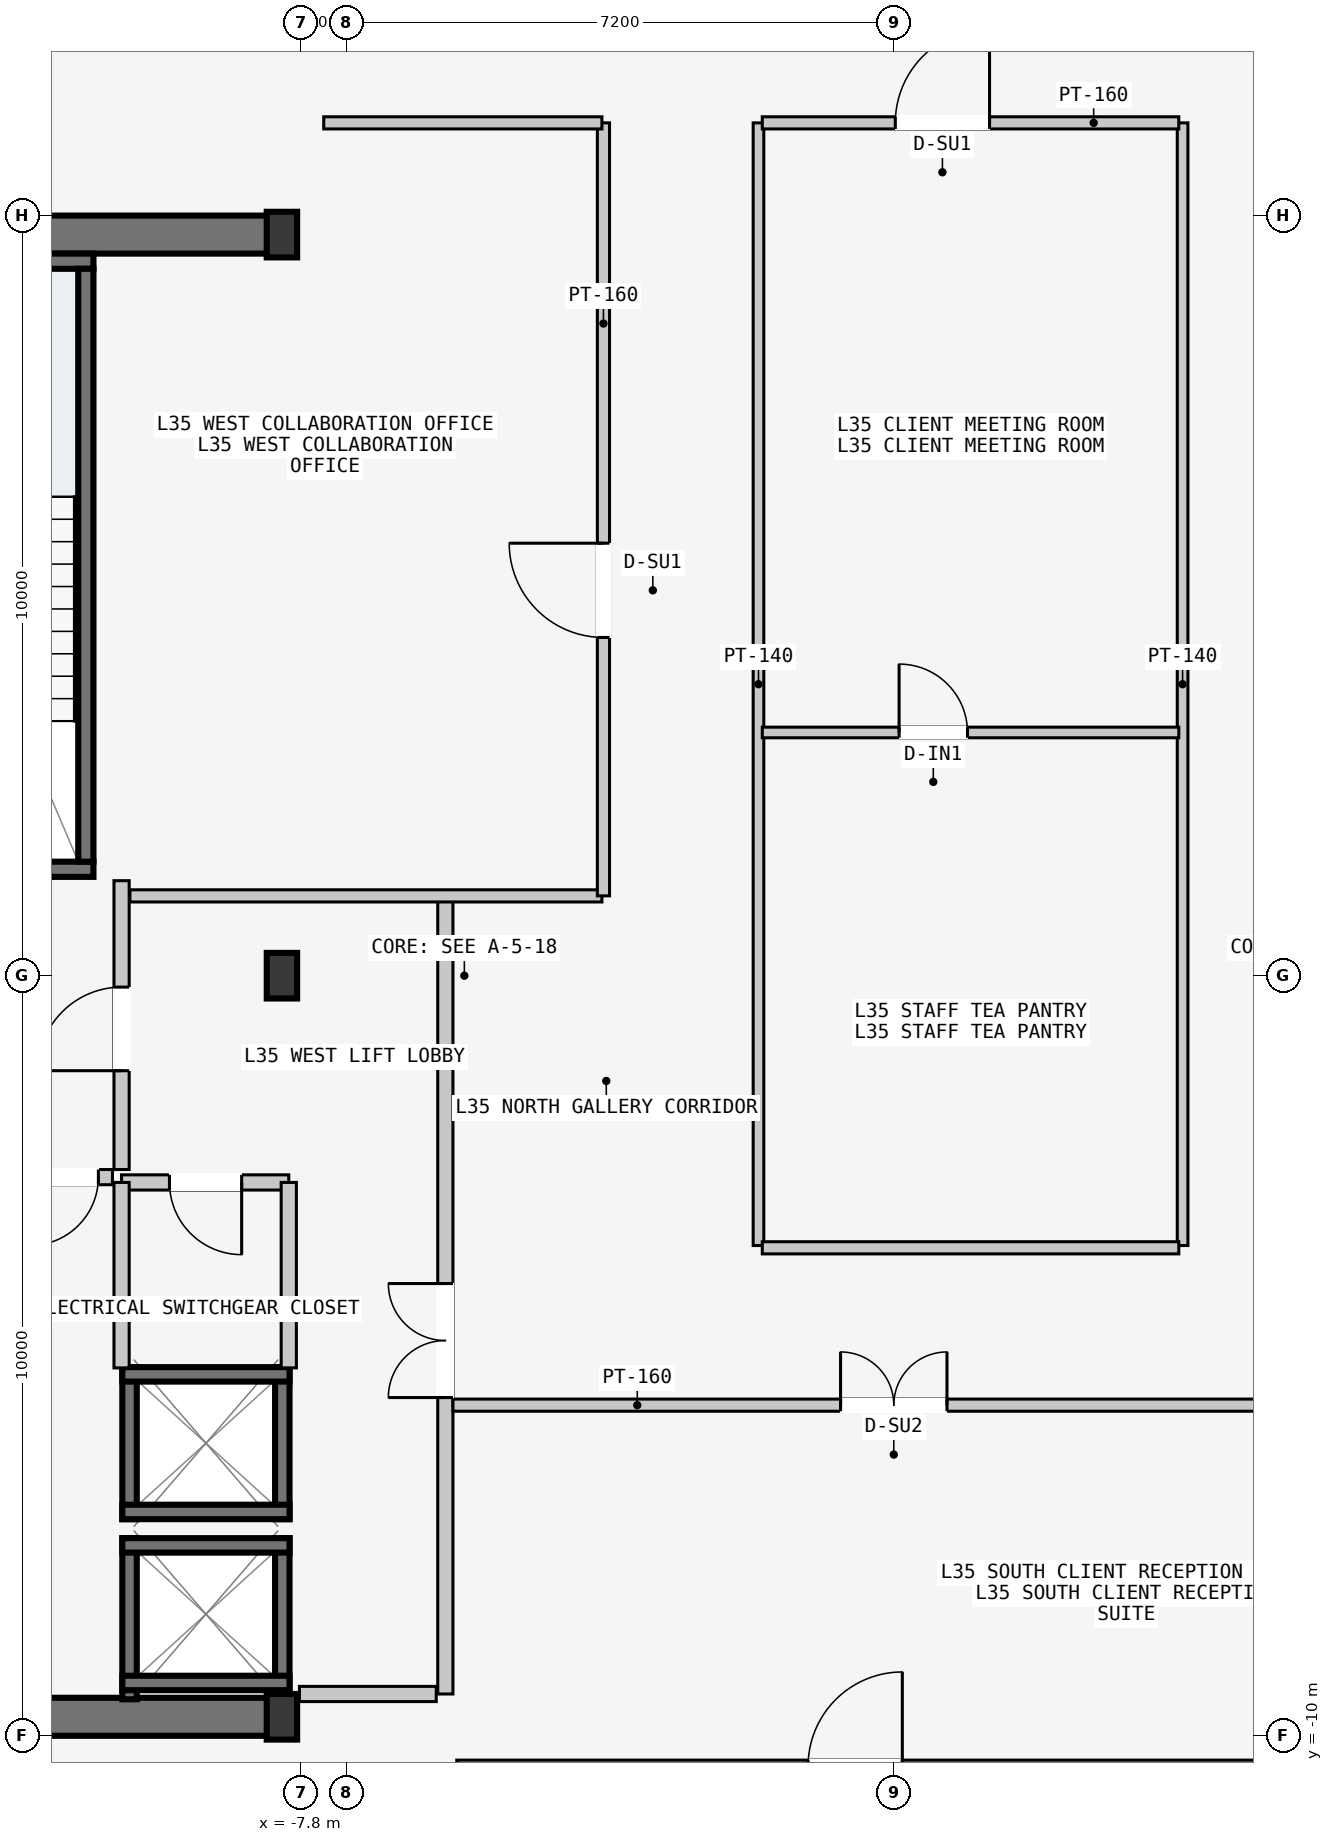
"""IFC4 building model, lengths in metres.
Left out: names, types, materials, properties, quantities, classifications, styles, units other than length and angle.
Written with IfcOpenShell. Run it as: python <this file> out.ifc"""

import sys

from ifc_helpers import new_model, si_unit, direction, frame, frame_2d, origin, origin_2d, place, context, subcontext, project, spatial, rectangle, i_section, extrude, element, fill, save


model = new_model("IFC4")
c1 = context("Model", 3, precision=1e-05, world=origin(), true_north=direction((0.0, 1.0)))
c2 = subcontext(c1, "Body", "Model", "MODEL_VIEW")
j1 = project(units=[si_unit("LENGTHUNIT", "METRE"), si_unit("PLANEANGLEUNIT", "RADIAN")], contexts=[c1])
p1 = place(None, origin())
s1 = spatial("IfcSite", under=j1, at=p1, CompositionType="ELEMENT")
p2 = place(p1, origin())
s2 = spatial("IfcBuilding", under=s1, at=p2, CompositionType="ELEMENT")
p3 = place(p2, frame((0.0, 0.0, 135.0)))
s3 = spatial("IfcBuildingStorey", under=s2, at=p3, CompositionType="ELEMENT", Elevation=135.0)
for number, where, z_axis, x_axis in (
    (1, (-14.53, -9.75, -0.2), (0.0, 0.0, 1.0), (1.0, 0.0, 0.0)),
    (2, (-14.53, 9.75, -0.2), (0.0, 0.0, 1.0), (1.0, 0.0, 0.0)),
):
    element("IfcWall", number, at=place(p3, frame(where, z_axis=z_axis, x_axis=x_axis)), inside=s3, PredefinedType="SHEAR", context=c2, shape_type="SweptSolid", body=[
        extrude(rectangle(XDim=6.46, YDim=0.5, at=frame_2d((3.23, 0.0))), origin(), (0.0, 0.0, 1.0), 3.6),
    ])
p4 = place(p3, frame((-14.25, 1.4, -0.2), z_axis=(0.0, 0.0, 1.0), x_axis=(1.0, 0.0, 0.0)))
e3 = element("IfcWall", 3, at=p4, inside=s3, PredefinedType="SOLIDWALL", context=c2, shape_type="SweptSolid", body=[
    extrude(rectangle(XDim=3.72, YDim=0.2, at=frame_2d((1.86, 0.0))), origin(), (0.0, 0.0, 1.0), 3.6),
])
p5 = place(p4, frame((1.5, 0.0, 0.2)))
e4 = element("IfcOpeningElement", 4, at=p5, cuts=e3, PredefinedType="OPENING", context=c2, shape_type="SweptSolid", body=[
    extrude(rectangle(XDim=1.12, YDim=2.18, at=frame_2d((0.56, 1.09))), frame((0.0, 0.11, 0.0), z_axis=(0.0, -1.0, 0.0), x_axis=(1.0, 0.0, 0.0)), (0.0, 0.0, 1.0), 0.22),
])
p6 = place(p3, frame((-14.25, 9.4, -0.2), z_axis=(0.0, 0.0, 1.0), x_axis=(1.0, 0.0, 0.0)))
e5 = element("IfcWall", 5, at=p6, inside=s3, PredefinedType="SOLIDWALL", context=c2, shape_type="SweptSolid", body=[
    extrude(rectangle(XDim=3.72, YDim=0.2, at=frame_2d((1.86, 0.0))), origin(), (0.0, 0.0, 1.0), 3.6),
])
p7 = place(p3, frame((-10.63, 1.5, -0.2), z_axis=(0.0, 0.0, 1.0), x_axis=(0.0, 1.0, 0.0)))
e6 = element("IfcWall", 6, at=p7, inside=s3, PredefinedType="SOLIDWALL", context=c2, shape_type="SweptSolid", body=[
    extrude(rectangle(XDim=7.8, YDim=0.2, at=frame_2d((3.9, 0.0))), origin(), (0.0, 0.0, 1.0), 3.6),
])
for number, where, z_axis, x_axis in (
    (7, (-8.05, -9.75, 0.0), (0.0, 0.0, 1.0), (1.0, 0.0, 0.0)),
    (8, (-8.05, 0.0, 0.0), (0.0, 0.0, 1.0), (1.0, 0.0, 0.0)),
    (9, (-8.05, 9.75, 0.0), (0.0, 0.0, 1.0), (1.0, 0.0, 0.0)),
):
    element("IfcColumn", number, at=place(p3, frame(where, z_axis=z_axis, x_axis=x_axis)), inside=s3, PredefinedType="COLUMN", context=c2, shape_type="SweptSolid", body=[
        extrude(i_section(OverallWidth=0.4, OverallDepth=0.6, WebThickness=0.022, FlangeThickness=0.036, at=origin_2d()), origin(), (0.0, 0.0, 1.0), 3.6),
    ])
for number, where, z_axis, x_axis in (
    (10, (-8.045, -9.52, -0.2), (0.0, 0.0, 1.0), (0.0, 1.0, 0.0)),
    (11, (-10.055, -9.52, -0.2), (0.0, 0.0, 1.0), (0.0, 1.0, 0.0)),
):
    element("IfcWall", number, at=place(p3, frame(where, z_axis=z_axis, x_axis=x_axis)), inside=s3, PredefinedType="SOLIDWALL", context=c2, shape_type="SweptSolid", body=[
        extrude(rectangle(XDim=2.12, YDim=0.19, at=frame_2d((1.06, 0.0))), origin(), (0.0, 0.0, 1.0), 3.6),
    ])
for number, where, z_axis, x_axis in (
    (12, (-10.15, -7.495, -0.2), (0.0, 0.0, 1.0), (1.0, 0.0, 0.0)),
    (13, (-10.15, -9.305, -0.2), (0.0, 0.0, 1.0), (1.0, 0.0, 0.0)),
):
    element("IfcWall", number, at=place(p3, frame(where, z_axis=z_axis, x_axis=x_axis)), inside=s3, PredefinedType="SOLIDWALL", context=c2, shape_type="SweptSolid", body=[
        extrude(rectangle(XDim=2.2, YDim=0.19, at=frame_2d((1.1, 0.0))), origin(), (0.0, 0.0, 1.0), 3.6),
    ])
for number, where, z_axis, x_axis in (
    (14, (-8.045, -7.15, -0.2), (0.0, 0.0, 1.0), (0.0, 1.0, 0.0)),
    (15, (-10.055, -7.15, -0.2), (0.0, 0.0, 1.0), (0.0, 1.0, 0.0)),
):
    element("IfcWall", number, at=place(p3, frame(where, z_axis=z_axis, x_axis=x_axis)), inside=s3, PredefinedType="SOLIDWALL", context=c2, shape_type="SweptSolid", body=[
        extrude(rectangle(XDim=2.0, YDim=0.19, at=frame_2d((1.0, 0.0))), origin(), (0.0, 0.0, 1.0), 3.6),
    ])
for number, where, z_axis, x_axis in (
    (16, (-10.15, -5.245, -0.2), (0.0, 0.0, 1.0), (1.0, 0.0, 0.0)),
    (17, (-10.15, -7.055, -0.2), (0.0, 0.0, 1.0), (1.0, 0.0, 0.0)),
):
    element("IfcWall", number, at=place(p3, frame(where, z_axis=z_axis, x_axis=x_axis)), inside=s3, PredefinedType="SOLIDWALL", context=c2, shape_type="SweptSolid", body=[
        extrude(rectangle(XDim=2.2, YDim=0.19, at=frame_2d((1.1, 0.0))), origin(), (0.0, 0.0, 1.0), 3.6),
    ])
p8 = place(p3, frame((-5.9, -9.45, 0.0), z_axis=(0.0, 0.0, 1.0), x_axis=(0.0, 1.0, 0.0)))
e18 = element("IfcWall", 18, at=p8, inside=s3, PredefinedType="PARTITIONING", context=c2, shape_type="SweptSolid", body=[
    extrude(rectangle(XDim=10.5, YDim=0.2, at=frame_2d((5.25, 0.0))), origin(), (0.0, 0.0, 1.0), 3.4),
])
p9 = place(p8, frame((3.9, 0.0, 0.0)))
e19 = element("IfcOpeningElement", 19, at=p9, cuts=e18, PredefinedType="OPENING", context=c2, shape_type="SweptSolid", body=[
    extrude(rectangle(XDim=1.5, YDim=2.2, at=frame_2d((0.75, 1.1))), frame((0.0, 0.11, 0.0), z_axis=(0.0, -1.0, 0.0), x_axis=(1.0, 0.0, 0.0)), (0.0, 0.0, 1.0), 0.22),
])
p10 = place(p3, frame((-6.02, -9.45, 0.0), z_axis=(0.0, 0.0, 1.0), x_axis=(-1.0, 0.0, 0.0)))
e20 = element("IfcWall", 20, at=p10, inside=s3, PredefinedType="PARTITIONING", context=c2, shape_type="SweptSolid", body=[
    extrude(rectangle(XDim=1.8, YDim=0.2, at=frame_2d((0.9, 0.0))), origin(), (0.0, 0.0, 1.0), 3.4),
])
p11 = place(p3, frame((-10.16, -2.55, 0.0), z_axis=(0.0, 0.0, 1.0), x_axis=(0.0, 1.0, 0.0)))
e21 = element("IfcWall", 21, at=p11, inside=s3, PredefinedType="PARTITIONING", context=c2, shape_type="SweptSolid", body=[
    extrude(rectangle(XDim=3.8, YDim=0.2, at=frame_2d((1.9, 0.0))), origin(), (0.0, 0.0, 1.0), 3.4),
])
p12 = place(p11, frame((1.3, 0.0, 0.0)))
e22 = element("IfcOpeningElement", 22, at=p12, cuts=e21, PredefinedType="OPENING", context=c2, shape_type="SweptSolid", body=[
    extrude(rectangle(XDim=1.1, YDim=2.15, at=frame_2d((0.55, 1.075))), frame((0.0, 0.11, 0.0), z_axis=(0.0, -1.0, 0.0), x_axis=(1.0, 0.0, 0.0)), (0.0, 0.0, 1.0), 0.22),
])
p13 = place(p3, frame((-10.28, -2.65, 0.0), z_axis=(0.0, 0.0, 1.0), x_axis=(-1.0, 0.0, 0.0)))
e23 = element("IfcWall", 23, at=p13, inside=s3, PredefinedType="PARTITIONING", context=c2, shape_type="SweptSolid", body=[
    extrude(rectangle(XDim=1.27, YDim=0.2, at=frame_2d((0.635, 0.0))), origin(), (0.0, 0.0, 1.0), 3.4),
])
p14 = place(p13, frame((0.185, 0.0, 0.0)))
e24 = element("IfcOpeningElement", 24, at=p14, cuts=e23, PredefinedType="OPENING", context=c2, shape_type="SweptSolid", body=[
    extrude(rectangle(XDim=0.9, YDim=2.15, at=frame_2d((0.45, 1.075))), frame((0.0, 0.11, 0.0), z_axis=(0.0, -1.0, 0.0), x_axis=(1.0, 0.0, 0.0)), (0.0, 0.0, 1.0), 0.22),
])
p15 = place(p3, frame((-7.96, -2.72, 0.0), z_axis=(0.0, 0.0, 1.0), x_axis=(-1.0, 0.0, 0.0)))
e25 = element("IfcWall", 25, at=p15, inside=s3, PredefinedType="PARTITIONING", context=c2, shape_type="SweptSolid", body=[
    extrude(rectangle(XDim=2.2, YDim=0.2, at=frame_2d((1.1, 0.0))), origin(), (0.0, 0.0, 1.0), 3.4),
])
p16 = place(p15, frame((0.62, 0.0, 0.0)))
e26 = element("IfcOpeningElement", 26, at=p16, cuts=e25, PredefinedType="OPENING", context=c2, shape_type="SweptSolid", body=[
    extrude(rectangle(XDim=0.95, YDim=2.1, at=frame_2d((0.475, 1.05))), frame((0.0, 0.11, 0.0), z_axis=(0.0, -1.0, 0.0), x_axis=(1.0, 0.0, 0.0)), (0.0, 0.0, 1.0), 0.22),
])
for number, where, z_axis, x_axis in (
    (27, (-7.96, -5.16, 0.0), (0.0, 0.0, 1.0), (0.0, 1.0, 0.0)),
    (28, (-10.16, -5.16, 0.0), (0.0, 0.0, 1.0), (0.0, 1.0, 0.0)),
):
    element("IfcWall", number, at=place(p3, frame(where, z_axis=z_axis, x_axis=x_axis)), inside=s3, PredefinedType="PARTITIONING", context=c2, shape_type="SweptSolid", body=[
        extrude(rectangle(XDim=2.44, YDim=0.2, at=frame_2d((1.22, 0.0))), origin(), (0.0, 0.0, 1.0), 3.4),
    ])
p17 = place(p3, frame((-10.05, 1.05, 0.0), z_axis=(0.0, 0.0, 1.0), x_axis=(1.0, 0.0, 0.0)))
e29 = element("IfcWall", 29, at=p17, inside=s3, PredefinedType="PARTITIONING", context=c2, shape_type="SweptSolid", body=[
    extrude(rectangle(XDim=6.21, YDim=0.16, at=frame_2d((3.105, 0.0))), origin(), (0.0, 0.0, 1.0), 3.4),
])
p18 = place(p3, frame((-3.82, 1.05, 0.0), z_axis=(0.0, 0.0, 1.0), x_axis=(0.0, 1.0, 0.0)))
e30 = element("IfcWall", 30, at=p18, inside=s3, PredefinedType="PARTITIONING", context=c2, shape_type="SweptSolid", body=[
    extrude(rectangle(XDim=10.17, YDim=0.16, at=frame_2d((5.085, 0.0))), origin(), (0.0, 0.0, 1.0), 3.4),
])
p19 = place(p18, frame((3.4, 0.0, 0.0)))
e31 = element("IfcOpeningElement", 31, at=p19, cuts=e30, PredefinedType="OPENING", context=c2, shape_type="SweptSolid", body=[
    extrude(rectangle(XDim=1.24, YDim=2.24, at=frame_2d((0.62, 1.12))), frame((0.0, 0.09, 0.0), z_axis=(0.0, -1.0, 0.0), x_axis=(1.0, 0.0, 0.0)), (0.0, 0.0, 1.0), 0.18),
])
p20 = place(p3, frame((-7.5, 11.22, 0.0), z_axis=(0.0, 0.0, 1.0), x_axis=(1.0, 0.0, 0.0)))
e32 = element("IfcWall", 32, at=p20, inside=s3, PredefinedType="PARTITIONING", context=c2, shape_type="SweptSolid", body=[
    extrude(rectangle(XDim=3.66, YDim=0.16, at=frame_2d((1.83, 0.0))), origin(), (0.0, 0.0, 1.0), 3.4),
])
for number, where, z_axis, x_axis in (
    (33, (-1.78, -3.55, 0.0), (0.0, 0.0, 1.0), (0.0, 1.0, 0.0)),
    (34, (3.8, -3.55, 0.0), (0.0, 0.0, 1.0), (0.0, 1.0, 0.0)),
):
    element("IfcWall", number, at=place(p3, frame(where, z_axis=z_axis, x_axis=x_axis)), inside=s3, PredefinedType="PARTITIONING", context=c2, shape_type="SweptSolid", body=[
        extrude(rectangle(XDim=14.77, YDim=0.14, at=frame_2d((7.385, 0.0))), origin(), (0.0, 0.0, 1.0), 3.4),
    ])
p21 = place(p3, frame((-1.73, -3.58, 0.0), z_axis=(0.0, 0.0, 1.0), x_axis=(1.0, 0.0, 0.0)))
e35 = element("IfcWall", 35, at=p21, inside=s3, PredefinedType="PARTITIONING", context=c2, shape_type="SweptSolid", body=[
    extrude(rectangle(XDim=5.48, YDim=0.16, at=frame_2d((2.74, 0.0))), origin(), (0.0, 0.0, 1.0), 3.4),
])
p22 = place(p3, frame((-1.73, 3.2, 0.0), z_axis=(0.0, 0.0, 1.0), x_axis=(1.0, 0.0, 0.0)))
e36 = element("IfcWall", 36, at=p22, inside=s3, PredefinedType="PARTITIONING", context=c2, shape_type="SweptSolid", body=[
    extrude(rectangle(XDim=5.48, YDim=0.14, at=frame_2d((2.74, 0.0))), origin(), (0.0, 0.0, 1.0), 3.4),
])
p23 = place(p22, frame((1.8, 0.0, 0.0)))
e37 = element("IfcOpeningElement", 37, at=p23, cuts=e36, PredefinedType="OPENING", context=c2, shape_type="SweptSolid", body=[
    extrude(rectangle(XDim=0.9, YDim=2.15, at=frame_2d((0.45, 1.075))), frame((0.0, 0.08, 0.0), z_axis=(0.0, -1.0, 0.0), x_axis=(1.0, 0.0, 0.0)), (0.0, 0.0, 1.0), 0.16),
])
p24 = place(p3, frame((-1.73, 11.22, 0.0), z_axis=(0.0, 0.0, 1.0), x_axis=(1.0, 0.0, 0.0)))
e38 = element("IfcWall", 38, at=p24, inside=s3, PredefinedType="PARTITIONING", context=c2, shape_type="SweptSolid", body=[
    extrude(rectangle(XDim=5.48, YDim=0.16, at=frame_2d((2.74, 0.0))), origin(), (0.0, 0.0, 1.0), 3.4),
])
p25 = place(p24, frame((1.75, 0.0, 0.0)))
e39 = element("IfcOpeningElement", 39, at=p25, cuts=e38, PredefinedType="OPENING", context=c2, shape_type="SweptSolid", body=[
    extrude(rectangle(XDim=1.24, YDim=2.24, at=frame_2d((0.62, 1.12))), frame((0.0, 0.09, 0.0), z_axis=(0.0, -1.0, 0.0), x_axis=(1.0, 0.0, 0.0)), (0.0, 0.0, 1.0), 0.18),
])
p26 = place(p3, frame((-5.8, -5.65, 0.0), z_axis=(0.0, 0.0, 1.0), x_axis=(1.0, 0.0, 0.0)))
e40 = element("IfcWall", 40, at=p26, inside=s3, PredefinedType="PARTITIONING", context=c2, shape_type="SweptSolid", body=[
    extrude(rectangle(XDim=11.6, YDim=0.16, at=frame_2d((5.8, 0.0))), origin(), (0.0, 0.0, 1.0), 3.4),
])
p27 = place(p26, frame((5.1, 0.0, 0.0)))
e41 = element("IfcOpeningElement", 41, at=p27, cuts=e40, PredefinedType="OPENING", context=c2, shape_type="SweptSolid", body=[
    extrude(rectangle(XDim=1.4, YDim=2.2, at=frame_2d((0.7, 1.1))), frame((0.0, 0.09, 0.0), z_axis=(0.0, -1.0, 0.0), x_axis=(1.0, 0.0, 0.0)), (0.0, 0.0, 1.0), 0.18),
])
p28 = place(p3, frame((-5.75, -10.4, 0.0), z_axis=(0.0, 0.0, 1.0), x_axis=(1.0, 0.0, 0.0)))
e42 = element("IfcWall", 42, at=p28, inside=s3, PredefinedType="PARTITIONING", context=c2, shape_type="SweptSolid", body=[
    extrude(rectangle(XDim=11.5, YDim=0.16, at=frame_2d((5.75, 0.0))), origin(), (0.0, 0.0, 1.0), 3.4),
])
p29 = place(p28, frame((4.622, 0.0, 0.0)))
e43 = element("IfcOpeningElement", 43, at=p29, cuts=e42, PredefinedType="OPENING", context=c2, shape_type="SweptSolid", body=[
    extrude(rectangle(XDim=1.24, YDim=2.24, at=frame_2d((0.62, 1.12))), frame((0.0, 0.09, 0.0), z_axis=(0.0, -1.0, 0.0), x_axis=(1.0, 0.0, 0.0)), (0.0, 0.0, 1.0), 0.18),
])
p30 = place(p9, origin())
e44 = element("IfcDoor", 44, at=p30, inside=s3, OperationType="DOUBLE_DOOR_SINGLE_SWING", PredefinedType="DOOR", context=c2, shape_type="SweptSolid", body=[
    extrude(rectangle(XDim=1.5, YDim=2.2, at=frame_2d((0.75, 1.1))), frame((0.0, 0.025, 0.0), z_axis=(0.0, -1.0, 0.0), x_axis=(1.0, 0.0, 0.0)), (0.0, 0.0, 1.0), 0.05),
])
fill(e19, e44)
p31 = place(p12, origin())
e45 = element("IfcDoor", 45, at=p31, inside=s3, OperationType="SINGLE_SWING_LEFT", PredefinedType="DOOR", context=c2, shape_type="SweptSolid", body=[
    extrude(rectangle(XDim=1.1, YDim=2.15, at=frame_2d((0.55, 1.075))), frame((0.0, 0.025, 0.0), z_axis=(0.0, -1.0, 0.0), x_axis=(1.0, 0.0, 0.0)), (0.0, 0.0, 1.0), 0.05),
])
fill(e22, e45)
p32 = place(p14, origin())
e46 = element("IfcDoor", 46, at=p32, inside=s3, OperationType="SINGLE_SWING_RIGHT", PredefinedType="DOOR", context=c2, shape_type="SweptSolid", body=[
    extrude(rectangle(XDim=0.9, YDim=2.15, at=frame_2d((0.45, 1.075))), frame((0.0, 0.025, 0.0), z_axis=(0.0, -1.0, 0.0), x_axis=(1.0, 0.0, 0.0)), (0.0, 0.0, 1.0), 0.05),
])
fill(e24, e46)
p33 = place(p16, origin())
e47 = element("IfcDoor", 47, at=p33, inside=s3, OperationType="SINGLE_SWING_LEFT", PredefinedType="DOOR", context=c2, shape_type="SweptSolid", body=[
    extrude(rectangle(XDim=0.95, YDim=2.1, at=frame_2d((0.475, 1.05))), frame((0.0, 0.025, 0.0), z_axis=(0.0, -1.0, 0.0), x_axis=(1.0, 0.0, 0.0)), (0.0, 0.0, 1.0), 0.05),
])
fill(e26, e47)
p34 = place(p19, origin())
e48 = element("IfcDoor", 48, at=p34, inside=s3, OperationType="SINGLE_SWING_RIGHT", PredefinedType="DOOR", context=c2, shape_type="SweptSolid", body=[
    extrude(rectangle(XDim=1.24, YDim=2.24, at=frame_2d((0.62, 1.12))), frame((0.0, 0.025, 0.0), z_axis=(0.0, -1.0, 0.0), x_axis=(1.0, 0.0, 0.0)), (0.0, 0.0, 1.0), 0.05),
])
fill(e31, e48)
p35 = place(p23, origin())
e49 = element("IfcDoor", 49, at=p35, inside=s3, OperationType="SINGLE_SWING_LEFT", PredefinedType="DOOR", context=c2, shape_type="SweptSolid", body=[
    extrude(rectangle(XDim=0.9, YDim=2.15, at=frame_2d((0.45, 1.075))), frame((0.0, 0.025, 0.0), z_axis=(0.0, -1.0, 0.0), x_axis=(1.0, 0.0, 0.0)), (0.0, 0.0, 1.0), 0.05),
])
fill(e37, e49)
p36 = place(p25, origin())
e50 = element("IfcDoor", 50, at=p36, inside=s3, OperationType="SINGLE_SWING_RIGHT", PredefinedType="DOOR", context=c2, shape_type="SweptSolid", body=[
    extrude(rectangle(XDim=1.24, YDim=2.24, at=frame_2d((0.62, 1.12))), frame((0.0, 0.025, 0.0), z_axis=(0.0, -1.0, 0.0), x_axis=(1.0, 0.0, 0.0)), (0.0, 0.0, 1.0), 0.05),
])
fill(e39, e50)
p37 = place(p27, origin())
e51 = element("IfcDoor", 51, at=p37, inside=s3, OperationType="DOUBLE_DOOR_SINGLE_SWING", PredefinedType="DOOR", context=c2, shape_type="SweptSolid", body=[
    extrude(rectangle(XDim=1.4, YDim=2.2, at=frame_2d((0.7, 1.1))), frame((0.0, 0.025, 0.0), z_axis=(0.0, -1.0, 0.0), x_axis=(1.0, 0.0, 0.0)), (0.0, 0.0, 1.0), 0.05),
])
fill(e41, e51)
save(model, sys.argv[1])
